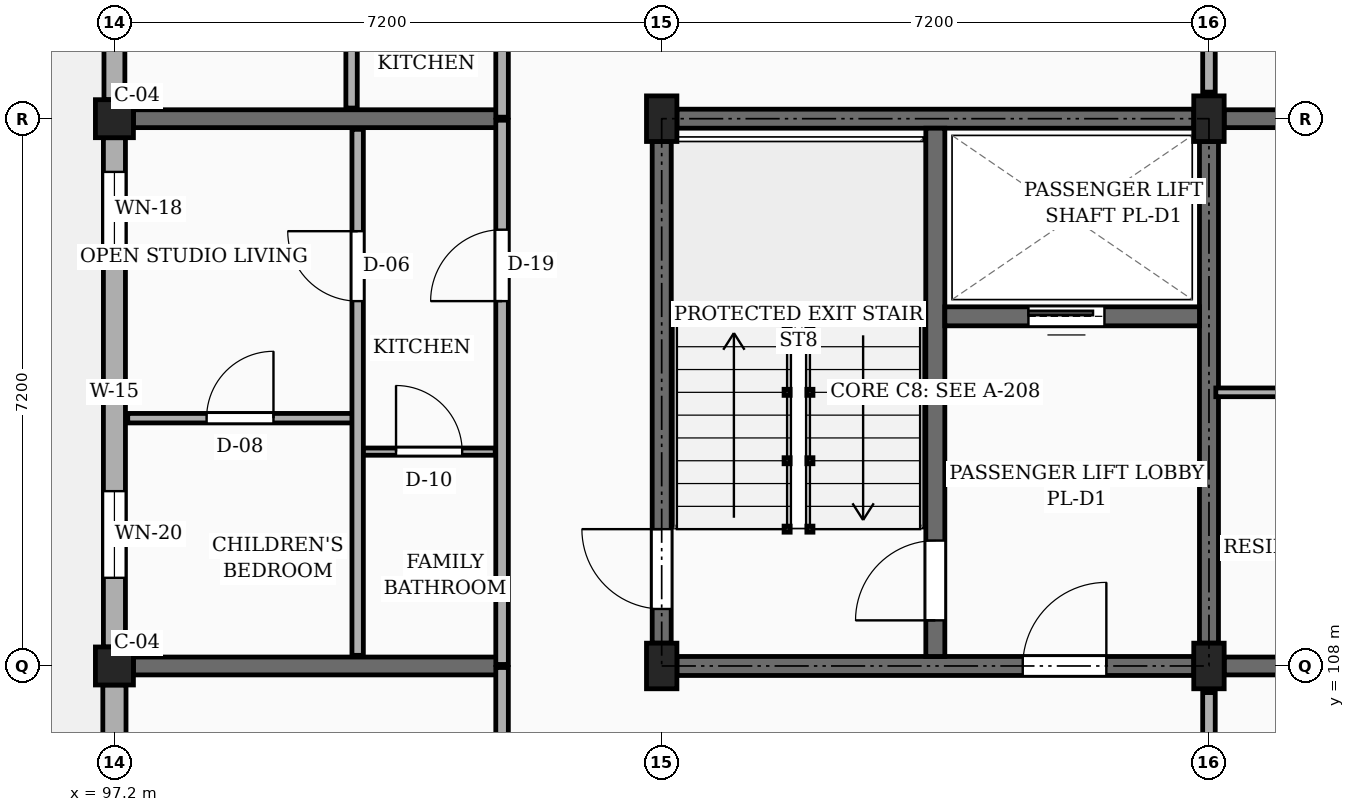
"""IFC4 building model, lengths in metres.
Left out: names, types, materials, properties, quantities, classifications, styles, units other than length and angle.
Written with IfcOpenShell. Run it as: python <this file> out.ifc"""

import sys

from ifc_helpers import new_model, si_unit, direction, frame, frame_2d, origin, origin_2d, place, context, subcontext, project, spatial, rectangle, extrude, element, fill, save


model = new_model("IFC4")
c1 = context("Model", 3, precision=1e-05, world=origin(), true_north=direction((0.0, 1.0)))
c2 = subcontext(c1, "Body", "Model", "MODEL_VIEW")
j1 = project(units=[si_unit("LENGTHUNIT", "METRE"), si_unit("PLANEANGLEUNIT", "RADIAN")], contexts=[c1])
p1 = place(None, origin())
s1 = spatial("IfcSite", under=j1, at=p1, CompositionType="ELEMENT")
p2 = place(p1, origin())
s2 = spatial("IfcBuilding", under=s1, at=p2, CompositionType="ELEMENT")
p3 = place(p2, frame((0.0, 0.0, 23.4)))
s3 = spatial("IfcBuildingStorey", under=s2, at=p3, CompositionType="ELEMENT", Elevation=23.4)
for number, where, z_axis, x_axis in (
    (1, (97.2, 108.0, 0.0), (0.0, 0.0, 1.0), (1.0, 0.0, 0.0)),
    (2, (97.2, 115.2, 0.0), (0.0, 0.0, 1.0), (1.0, 0.0, 0.0)),
):
    element("IfcColumn", number, at=place(p3, frame(where, z_axis=z_axis, x_axis=x_axis)), inside=s3, PredefinedType="COLUMN", context=c2, shape_type="SweptSolid", body=[
        extrude(rectangle(XDim=0.5, YDim=0.5, at=origin_2d()), origin(), (0.0, 0.0, 1.0), 3.15),
    ])
for number, where, z_axis, x_axis in (
    (3, (104.4, 108.0, 0.0), (0.0, 0.0, 1.0), (1.0, 0.0, 0.0)),
    (4, (104.4, 115.2, 0.0), (0.0, 0.0, 1.0), (1.0, 0.0, 0.0)),
    (5, (111.6, 108.0, 0.0), (0.0, 0.0, 1.0), (1.0, 0.0, 0.0)),
    (6, (111.6, 115.2, 0.0), (0.0, 0.0, 1.0), (1.0, 0.0, 0.0)),
):
    element("IfcColumn", number, at=place(p3, frame(where, z_axis=z_axis, x_axis=x_axis)), inside=s3, PredefinedType="COLUMN", context=c2, shape_type="SweptSolid", body=[
        extrude(rectangle(XDim=0.4, YDim=0.6, at=origin_2d()), origin(), (0.0, 0.0, 1.0), 3.15),
    ])
p4 = place(p3, frame((97.45, 108.0, 0.0), z_axis=(0.0, 0.0, 1.0), x_axis=(1.0, 0.0, 0.0)))
e7 = element("IfcWall", 7, at=p4, inside=s3, PredefinedType="SOLIDWALL", context=c2, shape_type="SweptSolid", body=[
    extrude(rectangle(XDim=4.85, YDim=0.235, at=frame_2d((2.425, 0.0))), origin(), (0.0, 0.0, 1.0), 2.19),
])
p5 = place(p3, frame((111.8, 108.0, 0.0), z_axis=(0.0, 0.0, 1.0), x_axis=(1.0, 0.0, 0.0)))
e8 = element("IfcWall", 8, at=p5, inside=s3, PredefinedType="SOLIDWALL", context=c2, shape_type="SweptSolid", body=[
    extrude(rectangle(XDim=6.75, YDim=0.235, at=frame_2d((3.375, 0.0))), origin(), (0.0, 0.0, 1.0), 2.19),
])
p6 = place(p5, frame((4.35, 0.0, 0.0)))
e9 = element("IfcOpeningElement", 9, at=p6, cuts=e8, PredefinedType="OPENING", context=c2, shape_type="SweptSolid", body=[
    extrude(rectangle(XDim=0.98, YDim=2.12, at=frame_2d((0.49, 1.06))), frame((0.0, 0.127, 0.0), z_axis=(0.0, -1.0, 0.0), x_axis=(1.0, 0.0, 0.0)), (0.0, 0.0, 1.0), 0.255),
])
p7 = place(p3, frame((97.45, 115.2, 0.0), z_axis=(0.0, 0.0, 1.0), x_axis=(1.0, 0.0, 0.0)))
e10 = element("IfcWall", 10, at=p7, inside=s3, PredefinedType="SOLIDWALL", context=c2, shape_type="SweptSolid", body=[
    extrude(rectangle(XDim=4.85, YDim=0.235, at=frame_2d((2.425, 0.0))), origin(), (0.0, 0.0, 1.0), 2.19),
])
p8 = place(p3, frame((111.8, 115.2, 0.0), z_axis=(0.0, 0.0, 1.0), x_axis=(1.0, 0.0, 0.0)))
e11 = element("IfcWall", 11, at=p8, inside=s3, PredefinedType="SOLIDWALL", context=c2, shape_type="SweptSolid", body=[
    extrude(rectangle(XDim=6.75, YDim=0.235, at=frame_2d((3.375, 0.0))), origin(), (0.0, 0.0, 1.0), 2.19),
])
p9 = place(p3, frame((97.2, 122.15, 0.0), z_axis=(0.0, 0.0, 1.0), x_axis=(0.0, -1.0, 0.0)))
e12 = element("IfcWall", 12, at=p9, inside=s3, PredefinedType="SOLIDWALL", context=c2, shape_type="SweptSolid", body=[
    extrude(rectangle(XDim=6.7, YDim=0.275, at=frame_2d((3.35, 0.0))), origin(), (0.0, 0.0, 1.0), 2.46),
])
p10 = place(p9, frame((0.45, 0.0, 0.78)))
e13 = element("IfcOpeningElement", 13, at=p10, cuts=e12, PredefinedType="OPENING", context=c2, shape_type="SweptSolid", body=[
    extrude(rectangle(XDim=1.44, YDim=1.26, at=frame_2d((0.72, 0.63))), frame((0.0, 0.147, 0.0), z_axis=(0.0, -1.0, 0.0), x_axis=(1.0, 0.0, 0.0)), (0.0, 0.0, 1.0), 0.295),
])
p11 = place(p9, frame((4.65, 0.0, 0.78)))
e14 = element("IfcOpeningElement", 14, at=p11, cuts=e12, PredefinedType="OPENING", context=c2, shape_type="SweptSolid", body=[
    extrude(rectangle(XDim=0.98, YDim=1.36, at=frame_2d((0.49, 0.68))), frame((0.0, 0.147, 0.0), z_axis=(0.0, -1.0, 0.0), x_axis=(1.0, 0.0, 0.0)), (0.0, 0.0, 1.0), 0.295),
])
p12 = place(p3, frame((97.2, 114.95, 0.0), z_axis=(0.0, 0.0, 1.0), x_axis=(0.0, -1.0, 0.0)))
e15 = element("IfcWall", 15, at=p12, inside=s3, PredefinedType="SOLIDWALL", context=c2, shape_type="SweptSolid", body=[
    extrude(rectangle(XDim=6.7, YDim=0.29, at=frame_2d((3.35, 0.0))), origin(), (0.0, 0.0, 1.0), 2.46),
])
p13 = place(p12, frame((0.45, 0.0, 0.78)))
e16 = element("IfcOpeningElement", 16, at=p13, cuts=e15, PredefinedType="OPENING", context=c2, shape_type="SweptSolid", body=[
    extrude(rectangle(XDim=0.98, YDim=1.36, at=frame_2d((0.49, 0.68))), frame((0.0, 0.155, 0.0), z_axis=(0.0, -1.0, 0.0), x_axis=(1.0, 0.0, 0.0)), (0.0, 0.0, 1.0), 0.31),
])
p14 = place(p12, frame((4.65, 0.0, 0.78)))
e17 = element("IfcOpeningElement", 17, at=p14, cuts=e15, PredefinedType="OPENING", context=c2, shape_type="SweptSolid", body=[
    extrude(rectangle(XDim=1.14, YDim=1.36, at=frame_2d((0.57, 0.68))), frame((0.0, 0.155, 0.0), z_axis=(0.0, -1.0, 0.0), x_axis=(1.0, 0.0, 0.0)), (0.0, 0.0, 1.0), 0.31),
])
p15 = place(p3, frame((97.2, 107.75, 0.0), z_axis=(0.0, 0.0, 1.0), x_axis=(0.0, -1.0, 0.0)))
e18 = element("IfcWall", 18, at=p15, inside=s3, PredefinedType="SOLIDWALL", context=c2, shape_type="SweptSolid", body=[
    extrude(rectangle(XDim=6.7, YDim=0.305, at=frame_2d((3.35, 0.0))), origin(), (0.0, 0.0, 1.0), 2.46),
])
p16 = place(p15, frame((2.8, 0.0, 0.0)))
e19 = element("IfcOpeningElement", 19, at=p16, cuts=e18, PredefinedType="OPENING", context=c2, shape_type="SweptSolid", body=[
    extrude(rectangle(XDim=1.36, YDim=2.12, at=frame_2d((0.68, 1.06))), frame((0.0, 0.163, 0.0), z_axis=(0.0, -1.0, 0.0), x_axis=(1.0, 0.0, 0.0)), (0.0, 0.0, 1.0), 0.325),
])
p17 = place(p15, frame((0.65, 0.0, 0.78)))
e20 = element("IfcOpeningElement", 20, at=p17, cuts=e18, PredefinedType="OPENING", context=c2, shape_type="SweptSolid", body=[
    extrude(rectangle(XDim=1.16, YDim=1.15, at=frame_2d((0.58, 0.575))), frame((0.0, 0.163, 0.0), z_axis=(0.0, -1.0, 0.0), x_axis=(1.0, 0.0, 0.0)), (0.0, 0.0, 1.0), 0.325),
])
p18 = place(p3, frame((104.4, 108.3, 0.0), z_axis=(0.0, 0.0, 1.0), x_axis=(0.0, 1.0, 0.0)))
e21 = element("IfcWall", 21, at=p18, inside=s3, PredefinedType="SHEAR", context=c2, shape_type="SweptSolid", body=[
    extrude(rectangle(XDim=6.6, YDim=0.25, at=frame_2d((3.3, 0.0))), origin(), (0.0, 0.0, 1.0), 2.89),
])
p19 = place(p18, frame((0.45, 0.0, 0.0)))
e22 = element("IfcOpeningElement", 22, at=p19, cuts=e21, PredefinedType="OPENING", context=c2, shape_type="SweptSolid", body=[
    extrude(rectangle(XDim=1.05, YDim=2.15, at=frame_2d((0.525, 1.075))), frame((0.0, 0.135, 0.0), z_axis=(0.0, -1.0, 0.0), x_axis=(1.0, 0.0, 0.0)), (0.0, 0.0, 1.0), 0.27),
])
p20 = place(p3, frame((104.6, 115.2, 0.0), z_axis=(0.0, 0.0, 1.0), x_axis=(1.0, 0.0, 0.0)))
e23 = element("IfcWall", 23, at=p20, inside=s3, PredefinedType="SHEAR", context=c2, shape_type="SweptSolid", body=[
    extrude(rectangle(XDim=6.8, YDim=0.25, at=frame_2d((3.4, 0.0))), origin(), (0.0, 0.0, 1.0), 2.89),
])
p21 = place(p3, frame((111.6, 108.3, 0.0), z_axis=(0.0, 0.0, 1.0), x_axis=(0.0, 1.0, 0.0)))
e24 = element("IfcWall", 24, at=p21, inside=s3, PredefinedType="SHEAR", context=c2, shape_type="SweptSolid", body=[
    extrude(rectangle(XDim=6.6, YDim=0.25, at=frame_2d((3.3, 0.0))), origin(), (0.0, 0.0, 1.0), 2.89),
])
p22 = place(p3, frame((104.6, 108.0, 0.0), z_axis=(0.0, 0.0, 1.0), x_axis=(1.0, 0.0, 0.0)))
e25 = element("IfcWall", 25, at=p22, inside=s3, PredefinedType="SHEAR", context=c2, shape_type="SweptSolid", body=[
    extrude(rectangle(XDim=6.8, YDim=0.25, at=frame_2d((3.4, 0.0))), origin(), (0.0, 0.0, 1.0), 2.89),
])
p23 = place(p22, frame((4.55, 0.0, 0.0)))
e26 = element("IfcOpeningElement", 26, at=p23, cuts=e25, PredefinedType="OPENING", context=c2, shape_type="SweptSolid", body=[
    extrude(rectangle(XDim=1.1, YDim=2.15, at=frame_2d((0.55, 1.075))), frame((0.0, 0.135, 0.0), z_axis=(0.0, -1.0, 0.0), x_axis=(1.0, 0.0, 0.0)), (0.0, 0.0, 1.0), 0.27),
])
p24 = place(p3, frame((108.0, 108.125, 0.0), z_axis=(0.0, 0.0, 1.0), x_axis=(0.0, 1.0, 0.0)))
e27 = element("IfcWall", 27, at=p24, inside=s3, PredefinedType="SHEAR", context=c2, shape_type="SweptSolid", body=[
    extrude(rectangle(XDim=6.95, YDim=0.25, at=frame_2d((3.475, 0.0))), origin(), (0.0, 0.0, 1.0), 2.89),
])
p25 = place(p24, frame((0.475, 0.0, 0.0)))
e28 = element("IfcOpeningElement", 28, at=p25, cuts=e27, PredefinedType="OPENING", context=c2, shape_type="SweptSolid", body=[
    extrude(rectangle(XDim=1.05, YDim=2.15, at=frame_2d((0.525, 1.075))), frame((0.0, 0.135, 0.0), z_axis=(0.0, -1.0, 0.0), x_axis=(1.0, 0.0, 0.0)), (0.0, 0.0, 1.0), 0.27),
])
p26 = place(p3, frame((108.125, 112.6, 0.0), z_axis=(0.0, 0.0, 1.0), x_axis=(1.0, 0.0, 0.0)))
e29 = element("IfcWall", 29, at=p26, inside=s3, PredefinedType="SHEAR", context=c2, shape_type="SweptSolid", body=[
    extrude(rectangle(XDim=3.35, YDim=0.25, at=frame_2d((1.675, 0.0))), origin(), (0.0, 0.0, 1.0), 2.89),
])
p27 = place(p26, frame((1.1, 0.0, 0.0)))
e30 = element("IfcOpeningElement", 30, at=p27, cuts=e29, PredefinedType="OPENING", context=c2, shape_type="SweptSolid", body=[
    extrude(rectangle(XDim=1.0, YDim=2.2, at=frame_2d((0.5, 1.1))), frame((0.0, 0.135, 0.0), z_axis=(0.0, -1.0, 0.0), x_axis=(1.0, 0.0, 0.0)), (0.0, 0.0, 1.0), 0.27),
])
p28 = place(p3, frame((102.3, 100.82, 0.0), z_axis=(0.0, 0.0, 1.0), x_axis=(0.0, 1.0, 0.0)))
e31 = element("IfcWall", 31, at=p28, inside=s3, PredefinedType="PARTITIONING", context=c2, shape_type="SweptSolid", body=[
    extrude(rectangle(XDim=7.16, YDim=0.165, at=frame_2d((3.58, 0.0))), origin(), (0.0, 0.0, 1.0), 2.325),
])
p29 = place(p28, frame((4.33, 0.0, 0.0)))
e32 = element("IfcOpeningElement", 32, at=p29, cuts=e31, PredefinedType="OPENING", context=c2, shape_type="SweptSolid", body=[
    extrude(rectangle(XDim=1.1, YDim=2.15, at=frame_2d((0.55, 1.075))), frame((0.0, 0.093, 0.0), z_axis=(0.0, -1.0, 0.0), x_axis=(1.0, 0.0, 0.0)), (0.0, 0.0, 1.0), 0.185),
])
p30 = place(p3, frame((102.3, 108.02, 0.0), z_axis=(0.0, 0.0, 1.0), x_axis=(0.0, 1.0, 0.0)))
e33 = element("IfcWall", 33, at=p30, inside=s3, PredefinedType="PARTITIONING", context=c2, shape_type="SweptSolid", body=[
    extrude(rectangle(XDim=7.16, YDim=0.165, at=frame_2d((3.58, 0.0))), origin(), (0.0, 0.0, 1.0), 2.325),
])
p31 = place(p30, frame((4.78, 0.0, 0.0)))
e34 = element("IfcOpeningElement", 34, at=p31, cuts=e33, PredefinedType="OPENING", context=c2, shape_type="SweptSolid", body=[
    extrude(rectangle(XDim=0.94, YDim=2.12, at=frame_2d((0.47, 1.06))), frame((0.0, 0.093, 0.0), z_axis=(0.0, -1.0, 0.0), x_axis=(1.0, 0.0, 0.0)), (0.0, 0.0, 1.0), 0.185),
])
p32 = place(p3, frame((102.3, 115.22, 0.0), z_axis=(0.0, 0.0, 1.0), x_axis=(0.0, 1.0, 0.0)))
e35 = element("IfcWall", 35, at=p32, inside=s3, PredefinedType="PARTITIONING", context=c2, shape_type="SweptSolid", body=[
    extrude(rectangle(XDim=7.16, YDim=0.165, at=frame_2d((3.58, 0.0))), origin(), (0.0, 0.0, 1.0), 2.325),
])
p33 = place(p32, frame((1.33, 0.0, 0.0)))
e36 = element("IfcOpeningElement", 36, at=p33, cuts=e35, PredefinedType="OPENING", context=c2, shape_type="SweptSolid", body=[
    extrude(rectangle(XDim=1.14, YDim=2.18, at=frame_2d((0.57, 1.09))), frame((0.0, 0.093, 0.0), z_axis=(0.0, -1.0, 0.0), x_axis=(1.0, 0.0, 0.0)), (0.0, 0.0, 1.0), 0.185),
])
p34 = place(p3, frame((111.6, 101.15, 0.0), z_axis=(0.0, 0.0, 1.0), x_axis=(0.0, 1.0, 0.0)))
e37 = element("IfcWall", 37, at=p34, inside=s3, PredefinedType="PARTITIONING", context=c2, shape_type="SweptSolid", body=[
    extrude(rectangle(XDim=6.5, YDim=0.165, at=frame_2d((3.25, 0.0))), origin(), (0.0, 0.0, 1.0), 2.325),
])
p35 = place(p34, frame((1.1, 0.0, 0.0)))
e38 = element("IfcOpeningElement", 38, at=p35, cuts=e37, PredefinedType="OPENING", context=c2, shape_type="SweptSolid", body=[
    extrude(rectangle(XDim=1.14, YDim=2.18, at=frame_2d((0.57, 1.09))), frame((0.0, 0.093, 0.0), z_axis=(0.0, -1.0, 0.0), x_axis=(1.0, 0.0, 0.0)), (0.0, 0.0, 1.0), 0.185),
])
p36 = place(p3, frame((111.6, 115.55, 0.0), z_axis=(0.0, 0.0, 1.0), x_axis=(0.0, 1.0, 0.0)))
e39 = element("IfcWall", 39, at=p36, inside=s3, PredefinedType="PARTITIONING", context=c2, shape_type="SweptSolid", body=[
    extrude(rectangle(XDim=6.5, YDim=0.165, at=frame_2d((3.25, 0.0))), origin(), (0.0, 0.0, 1.0), 2.325),
])
p37 = place(p36, frame((1.1, 0.0, 0.0)))
e40 = element("IfcOpeningElement", 40, at=p37, cuts=e39, PredefinedType="OPENING", context=c2, shape_type="SweptSolid", body=[
    extrude(rectangle(XDim=1.0, YDim=2.15, at=frame_2d((0.5, 1.075))), frame((0.0, 0.093, 0.0), z_axis=(0.0, -1.0, 0.0), x_axis=(1.0, 0.0, 0.0)), (0.0, 0.0, 1.0), 0.185),
])
p38 = place(p3, frame((97.375, 111.26, 0.0), z_axis=(0.0, 0.0, 1.0), x_axis=(1.0, 0.0, 0.0)))
e41 = element("IfcWall", 41, at=p38, inside=s3, PredefinedType="PARTITIONING", context=c2, shape_type="SweptSolid", body=[
    extrude(rectangle(XDim=2.955, YDim=0.125, at=frame_2d((1.478, 0.0))), origin(), (0.0, 0.0, 1.0), 2.325),
])
p39 = place(p38, frame((1.038, 0.0, 0.0)))
e42 = element("IfcOpeningElement", 42, at=p39, cuts=e41, PredefinedType="OPENING", context=c2, shape_type="SweptSolid", body=[
    extrude(rectangle(XDim=0.88, YDim=2.08, at=frame_2d((0.44, 1.04))), frame((0.0, 0.073, 0.0), z_axis=(0.0, -1.0, 0.0), x_axis=(1.0, 0.0, 0.0)), (0.0, 0.0, 1.0), 0.145),
])
p40 = place(p3, frame((100.47, 110.82, 0.0), z_axis=(0.0, 0.0, 1.0), x_axis=(1.0, 0.0, 0.0)))
e43 = element("IfcWall", 43, at=p40, inside=s3, PredefinedType="PARTITIONING", context=c2, shape_type="SweptSolid", body=[
    extrude(rectangle(XDim=1.74, YDim=0.095, at=frame_2d((0.87, 0.0))), origin(), (0.0, 0.0, 1.0), 2.325),
])
p41 = place(p40, frame((0.435, 0.0, 0.0)))
e44 = element("IfcOpeningElement", 44, at=p41, cuts=e43, PredefinedType="OPENING", context=c2, shape_type="SweptSolid", body=[
    extrude(rectangle(XDim=0.87, YDim=2.05, at=frame_2d((0.435, 1.025))), frame((0.0, 0.058, 0.0), z_axis=(0.0, -1.0, 0.0), x_axis=(1.0, 0.0, 0.0)), (0.0, 0.0, 1.0), 0.115),
])
p42 = place(p3, frame((100.4, 108.14, 0.0), z_axis=(0.0, 0.0, 1.0), x_axis=(0.0, 1.0, 0.0)))
e45 = element("IfcWall", 45, at=p42, inside=s3, PredefinedType="PARTITIONING", context=c2, shape_type="SweptSolid", body=[
    extrude(rectangle(XDim=6.92, YDim=0.15, at=frame_2d((3.46, 0.0))), origin(), (0.0, 0.0, 1.0), 2.325),
])
p43 = place(p42, frame((4.66, 0.0, 0.0)))
e46 = element("IfcOpeningElement", 46, at=p43, cuts=e45, PredefinedType="OPENING", context=c2, shape_type="SweptSolid", body=[
    extrude(rectangle(XDim=0.92, YDim=2.1, at=frame_2d((0.46, 1.05))), frame((0.0, 0.085, 0.0), z_axis=(0.0, -1.0, 0.0), x_axis=(1.0, 0.0, 0.0)), (0.0, 0.0, 1.0), 0.17),
])
p44 = place(p3, frame((111.69, 111.6, 0.0), z_axis=(0.0, 0.0, 1.0), x_axis=(1.0, 0.0, 0.0)))
e47 = element("IfcWall", 47, at=p44, inside=s3, PredefinedType="PARTITIONING", context=c2, shape_type="SweptSolid", body=[
    extrude(rectangle(XDim=6.935, YDim=0.115, at=frame_2d((3.468, 0.0))), origin(), (0.0, 0.0, 1.0), 2.325),
])
p45 = place(p44, frame((2.6, 0.0, 0.0)))
e48 = element("IfcOpeningElement", 48, at=p45, cuts=e47, PredefinedType="OPENING", context=c2, shape_type="SweptSolid", body=[
    extrude(rectangle(XDim=0.92, YDim=2.1, at=frame_2d((0.46, 1.05))), frame((0.0, 0.067, 0.0), z_axis=(0.0, -1.0, 0.0), x_axis=(1.0, 0.0, 0.0)), (0.0, 0.0, 1.0), 0.135),
])
p46 = place(p3, frame((100.32, 115.34, 0.0), z_axis=(0.0, 0.0, 1.0), x_axis=(0.0, 1.0, 0.0)))
e49 = element("IfcWall", 49, at=p46, inside=s3, PredefinedType="PARTITIONING", context=c2, shape_type="SweptSolid", body=[
    extrude(rectangle(XDim=6.92, YDim=0.15, at=frame_2d((3.46, 0.0))), origin(), (0.0, 0.0, 1.0), 2.325),
])
p47 = place(p46, frame((1.31, 0.0, 0.0)))
e50 = element("IfcOpeningElement", 50, at=p47, cuts=e49, PredefinedType="OPENING", context=c2, shape_type="SweptSolid", body=[
    extrude(rectangle(XDim=0.95, YDim=2.1, at=frame_2d((0.475, 1.05))), frame((0.0, 0.085, 0.0), z_axis=(0.0, -1.0, 0.0), x_axis=(1.0, 0.0, 0.0)), (0.0, 0.0, 1.0), 0.17),
])
p48 = place(p13, origin())
e51 = element("IfcWindow", 51, at=p48, inside=s3, PartitioningType="SINGLE_PANEL", PredefinedType="WINDOW", context=c2, shape_type="SweptSolid", body=[
    extrude(rectangle(XDim=0.98, YDim=1.36, at=frame_2d((0.49, 0.68))), frame((0.0, 0.03, 0.0), z_axis=(0.0, -1.0, 0.0), x_axis=(1.0, 0.0, 0.0)), (0.0, 0.0, 1.0), 0.06),
])
fill(e16, e51)
p49 = place(p14, origin())
e52 = element("IfcWindow", 52, at=p49, inside=s3, PartitioningType="SINGLE_PANEL", PredefinedType="WINDOW", context=c2, shape_type="SweptSolid", body=[
    extrude(rectangle(XDim=1.14, YDim=1.36, at=frame_2d((0.57, 0.68))), frame((0.0, 0.03, 0.0), z_axis=(0.0, -1.0, 0.0), x_axis=(1.0, 0.0, 0.0)), (0.0, 0.0, 1.0), 0.06),
])
fill(e17, e52)
p50 = place(p19, origin())
e53 = element("IfcDoor", 53, at=p50, inside=s3, OperationType="SINGLE_SWING_RIGHT", PredefinedType="DOOR", context=c2, shape_type="SweptSolid", body=[
    extrude(rectangle(XDim=1.05, YDim=2.15, at=frame_2d((0.525, 1.075))), frame((0.0, 0.025, 0.0), z_axis=(0.0, -1.0, 0.0), x_axis=(1.0, 0.0, 0.0)), (0.0, 0.0, 1.0), 0.05),
])
fill(e22, e53)
p51 = place(p23, frame((1.1, 0.0, 0.0), z_axis=(0.0, 0.0, 1.0), x_axis=(-1.0, 0.0, 0.0)))
e54 = element("IfcDoor", 54, at=p51, inside=s3, OperationType="SINGLE_SWING_RIGHT", PredefinedType="DOOR", context=c2, shape_type="SweptSolid", body=[
    extrude(rectangle(XDim=1.1, YDim=2.15, at=frame_2d((0.55, 1.075))), frame((0.0, 0.025, 0.0), z_axis=(0.0, -1.0, 0.0), x_axis=(1.0, 0.0, 0.0)), (0.0, 0.0, 1.0), 0.05),
])
fill(e26, e54)
p52 = place(p25, origin())
e55 = element("IfcDoor", 55, at=p52, inside=s3, OperationType="SINGLE_SWING_LEFT", PredefinedType="DOOR", context=c2, shape_type="SweptSolid", body=[
    extrude(rectangle(XDim=1.05, YDim=2.15, at=frame_2d((0.525, 1.075))), frame((0.0, 0.025, 0.0), z_axis=(0.0, -1.0, 0.0), x_axis=(1.0, 0.0, 0.0)), (0.0, 0.0, 1.0), 0.05),
])
fill(e28, e55)
p53 = place(p27, origin())
e56 = element("IfcDoor", 56, at=p53, inside=s3, OperationType="SLIDING_TO_LEFT", PredefinedType="DOOR", context=c2, shape_type="SweptSolid", body=[
    extrude(rectangle(XDim=1.0, YDim=2.2, at=frame_2d((0.5, 1.1))), frame((0.0, 0.025, 0.0), z_axis=(0.0, -1.0, 0.0), x_axis=(1.0, 0.0, 0.0)), (0.0, 0.0, 1.0), 0.05),
])
fill(e30, e56)
p54 = place(p31, origin())
e57 = element("IfcDoor", 57, at=p54, inside=s3, OperationType="SINGLE_SWING_LEFT", PredefinedType="DOOR", context=c2, shape_type="SweptSolid", body=[
    extrude(rectangle(XDim=0.94, YDim=2.12, at=frame_2d((0.47, 1.06))), frame((0.0, 0.025, 0.0), z_axis=(0.0, -1.0, 0.0), x_axis=(1.0, 0.0, 0.0)), (0.0, 0.0, 1.0), 0.05),
])
fill(e34, e57)
p55 = place(p39, origin())
e58 = element("IfcDoor", 58, at=p55, inside=s3, OperationType="SINGLE_SWING_RIGHT", PredefinedType="DOOR", context=c2, shape_type="SweptSolid", body=[
    extrude(rectangle(XDim=0.88, YDim=2.08, at=frame_2d((0.44, 1.04))), frame((0.0, 0.025, 0.0), z_axis=(0.0, -1.0, 0.0), x_axis=(1.0, 0.0, 0.0)), (0.0, 0.0, 1.0), 0.05),
])
fill(e42, e58)
p56 = place(p41, origin())
e59 = element("IfcDoor", 59, at=p56, inside=s3, OperationType="SINGLE_SWING_LEFT", PredefinedType="DOOR", context=c2, shape_type="SweptSolid", body=[
    extrude(rectangle(XDim=0.87, YDim=2.05, at=frame_2d((0.435, 1.025))), frame((0.0, 0.025, 0.0), z_axis=(0.0, -1.0, 0.0), x_axis=(1.0, 0.0, 0.0)), (0.0, 0.0, 1.0), 0.05),
])
fill(e44, e59)
p57 = place(p43, origin())
e60 = element("IfcDoor", 60, at=p57, inside=s3, OperationType="SINGLE_SWING_RIGHT", PredefinedType="DOOR", context=c2, shape_type="SweptSolid", body=[
    extrude(rectangle(XDim=0.92, YDim=2.1, at=frame_2d((0.46, 1.05))), frame((0.0, 0.025, 0.0), z_axis=(0.0, -1.0, 0.0), x_axis=(1.0, 0.0, 0.0)), (0.0, 0.0, 1.0), 0.05),
])
fill(e46, e60)
save(model, sys.argv[1])
